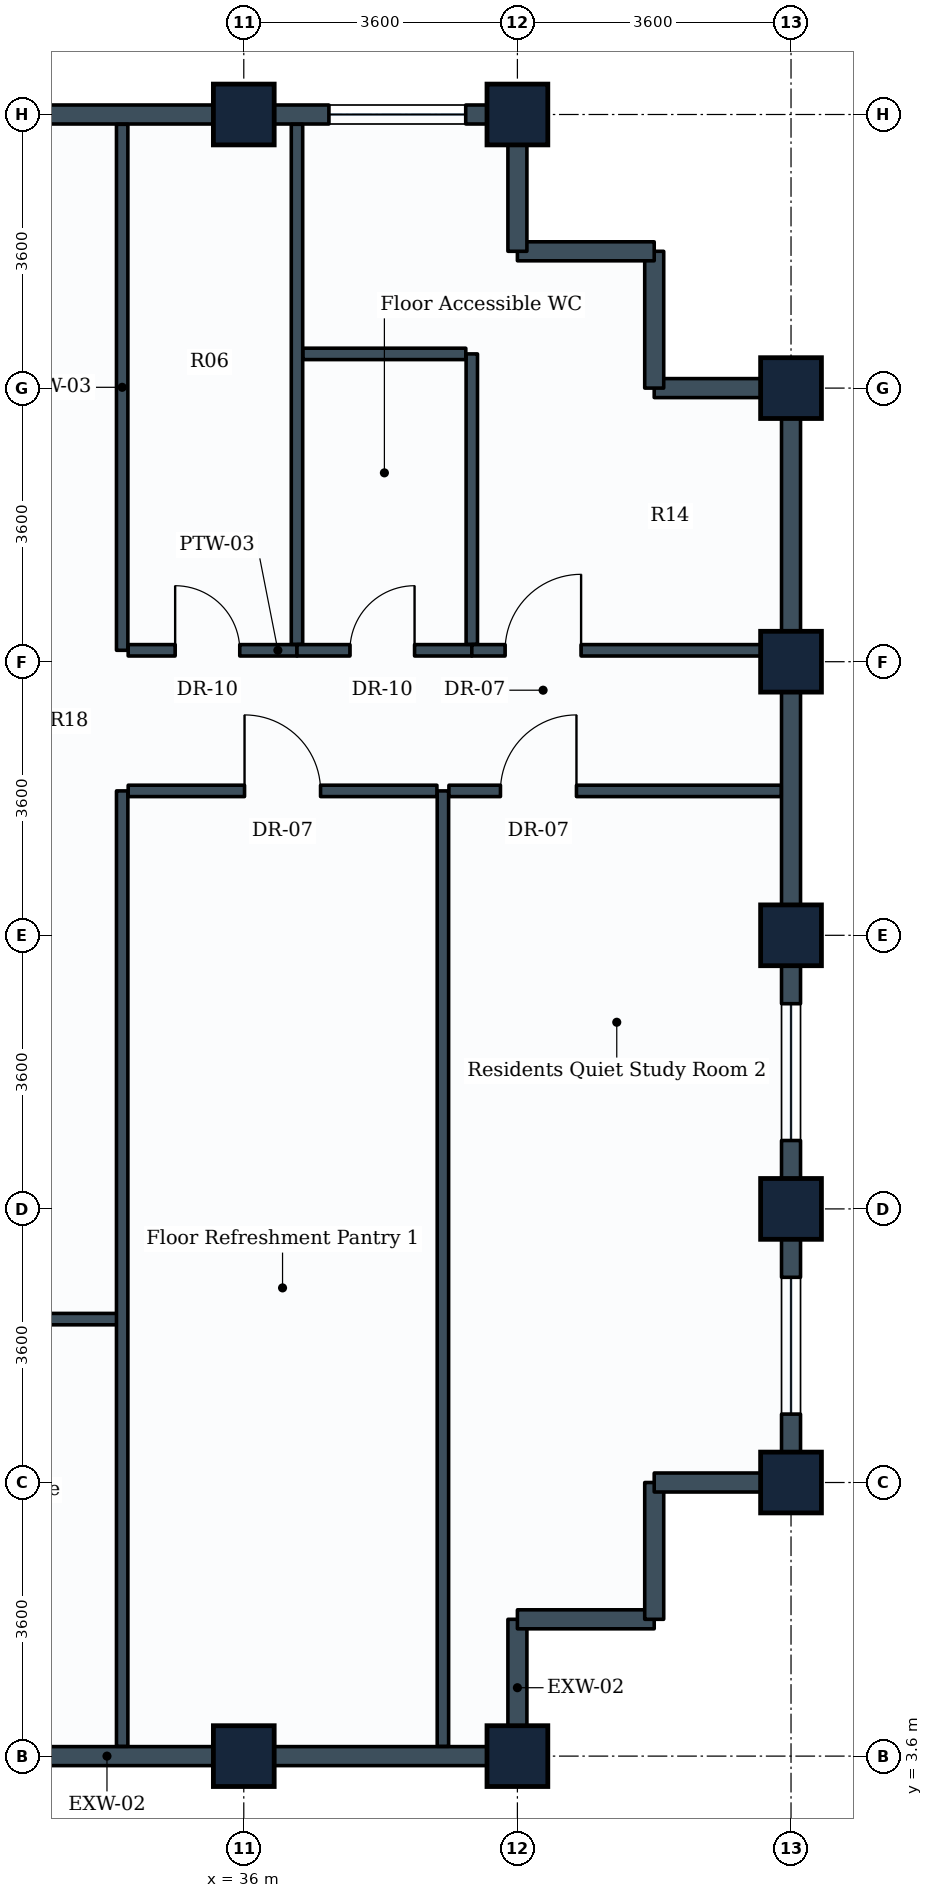
"""IFC4 building model, lengths in metres.
Left out: names, types, materials, properties, quantities, classifications, styles, units other than length and angle.
Written with IfcOpenShell. Run it as: python <this file> out.ifc"""

import sys

from ifc_helpers import new_model, si_unit, direction, frame, frame_2d, origin, origin_2d, place, context, subcontext, project, spatial, rectangle, extrude, element, fill, save


model = new_model("IFC4")
c1 = context("Model", 3, precision=1e-05, world=origin(), true_north=direction((0.0, 1.0)))
c2 = subcontext(c1, "Body", "Model", "MODEL_VIEW")
j1 = project(units=[si_unit("LENGTHUNIT", "METRE"), si_unit("PLANEANGLEUNIT", "RADIAN")], contexts=[c1])
p1 = place(None, origin())
s1 = spatial("IfcSite", under=j1, at=p1, CompositionType="ELEMENT")
p2 = place(p1, origin())
s2 = spatial("IfcBuilding", under=s1, at=p2, CompositionType="ELEMENT")
p3 = place(p2, frame((0.0, 0.0, 259.4)))
s3 = spatial("IfcBuildingStorey", under=s2, at=p3, CompositionType="ELEMENT", Elevation=259.4)
for number, where, z_axis, x_axis in (
    (1, (36.0, 3.6, 0.0), (0.0, 0.0, 1.0), (1.0, 0.0, 0.0)),
    (2, (36.0, 25.2, 0.0), (0.0, 0.0, 1.0), (1.0, 0.0, 0.0)),
    (3, (39.6, 3.6, 0.0), (0.0, 0.0, 1.0), (1.0, 0.0, 0.0)),
    (4, (39.6, 25.2, 0.0), (0.0, 0.0, 1.0), (1.0, 0.0, 0.0)),
    (5, (43.2, 7.2, 0.0), (0.0, 0.0, 1.0), (1.0, 0.0, 0.0)),
    (6, (43.2, 10.8, 0.0), (0.0, 0.0, 1.0), (0.0, 1.0, 0.0)),
    (7, (43.2, 14.4, 0.0), (0.0, 0.0, 1.0), (0.0, 1.0, 0.0)),
    (8, (43.2, 18.0, 0.0), (0.0, 0.0, 1.0), (0.0, 1.0, 0.0)),
    (9, (43.2, 21.6, 0.0), (0.0, 0.0, 1.0), (0.0, 1.0, 0.0)),
):
    element("IfcColumn", number, at=place(p3, frame(where, z_axis=z_axis, x_axis=x_axis)), inside=s3, PredefinedType="COLUMN", context=c2, shape_type="SweptSolid", body=[
        extrude(rectangle(XDim=0.8, YDim=0.8, at=origin_2d()), origin(), (0.0, 0.0, 1.0), 3.6),
    ])
for number, where, z_axis, x_axis in (
    (10, (36.0, 3.6, 0.0), (0.0, 0.0, 1.0), (-1.0, 0.0, 0.0)),
    (11, (39.6, 3.6, 0.0), (0.0, 0.0, 1.0), (-1.0, 0.0, 0.0)),
):
    element("IfcWall", number, at=place(p3, frame(where, z_axis=z_axis, x_axis=x_axis)), inside=s3, PredefinedType="STANDARD", context=c2, shape_type="SweptSolid", body=[
        extrude(rectangle(XDim=3.6, YDim=0.25, at=frame_2d((1.8, 0.0))), origin(), (0.0, 0.0, 1.0), 2.83),
    ])
p4 = place(p3, frame((39.6, 5.4, 0.0), z_axis=(0.0, 0.0, 1.0), x_axis=(0.0, -1.0, 0.0)))
e12 = element("IfcWall", 12, at=p4, inside=s3, PredefinedType="STANDARD", context=c2, shape_type="SweptSolid", body=[
    extrude(rectangle(XDim=1.8, YDim=0.25, at=frame_2d((0.9, 0.0))), origin(), (0.0, 0.0, 1.0), 2.83),
])
p5 = place(p3, frame((41.4, 5.4, 0.0), z_axis=(0.0, 0.0, 1.0), x_axis=(-1.0, 0.0, 0.0)))
e13 = element("IfcWall", 13, at=p5, inside=s3, PredefinedType="STANDARD", context=c2, shape_type="SweptSolid", body=[
    extrude(rectangle(XDim=1.8, YDim=0.25, at=frame_2d((0.9, 0.0))), origin(), (0.0, 0.0, 1.0), 3.335),
])
p6 = place(p3, frame((41.4, 7.2, 0.0), z_axis=(0.0, 0.0, 1.0), x_axis=(0.0, -1.0, 0.0)))
e14 = element("IfcWall", 14, at=p6, inside=s3, PredefinedType="STANDARD", context=c2, shape_type="SweptSolid", body=[
    extrude(rectangle(XDim=1.8, YDim=0.25, at=frame_2d((0.9, 0.0))), origin(), (0.0, 0.0, 1.0), 3.335),
])
p7 = place(p3, frame((43.2, 7.2, 0.0), z_axis=(0.0, 0.0, 1.0), x_axis=(-1.0, 0.0, 0.0)))
e15 = element("IfcWall", 15, at=p7, inside=s3, PredefinedType="STANDARD", context=c2, shape_type="SweptSolid", body=[
    extrude(rectangle(XDim=1.8, YDim=0.25, at=frame_2d((0.9, 0.0))), origin(), (0.0, 0.0, 1.0), 2.83),
])
p8 = place(p3, frame((43.2, 10.8, 0.0), z_axis=(0.0, 0.0, 1.0), x_axis=(0.0, -1.0, 0.0)))
e16 = element("IfcWall", 16, at=p8, inside=s3, PredefinedType="STANDARD", context=c2, shape_type="SweptSolid", body=[
    extrude(rectangle(XDim=3.6, YDim=0.25, at=frame_2d((1.8, 0.0))), origin(), (0.0, 0.0, 1.0), 2.83),
])
p9 = place(p8, frame((0.9, 0.0, 0.85)))
e17 = element("IfcOpeningElement", 17, at=p9, cuts=e16, PredefinedType="OPENING", context=c2, shape_type="SweptSolid", body=[
    extrude(rectangle(XDim=1.8, YDim=1.35, at=frame_2d((0.9, 0.675))), frame((0.0, 0.135, 0.0), z_axis=(0.0, -1.0, 0.0), x_axis=(1.0, 0.0, 0.0)), (0.0, 0.0, 1.0), 0.27),
])
p10 = place(p3, frame((43.2, 14.4, 0.0), z_axis=(0.0, 0.0, 1.0), x_axis=(0.0, -1.0, 0.0)))
e18 = element("IfcWall", 18, at=p10, inside=s3, PredefinedType="STANDARD", context=c2, shape_type="SweptSolid", body=[
    extrude(rectangle(XDim=3.6, YDim=0.25, at=frame_2d((1.8, 0.0))), origin(), (0.0, 0.0, 1.0), 2.83),
])
p11 = place(p10, frame((0.9, 0.0, 0.85)))
e19 = element("IfcOpeningElement", 19, at=p11, cuts=e18, PredefinedType="OPENING", context=c2, shape_type="SweptSolid", body=[
    extrude(rectangle(XDim=1.8, YDim=1.35, at=frame_2d((0.9, 0.675))), frame((0.0, 0.135, 0.0), z_axis=(0.0, -1.0, 0.0), x_axis=(1.0, 0.0, 0.0)), (0.0, 0.0, 1.0), 0.27),
])
for number, where, z_axis, x_axis in (
    (20, (43.2, 18.0, 0.0), (0.0, 0.0, 1.0), (0.0, -1.0, 0.0)),
    (21, (43.2, 21.6, 0.0), (0.0, 0.0, 1.0), (0.0, -1.0, 0.0)),
):
    element("IfcWall", number, at=place(p3, frame(where, z_axis=z_axis, x_axis=x_axis)), inside=s3, PredefinedType="STANDARD", context=c2, shape_type="SweptSolid", body=[
        extrude(rectangle(XDim=3.6, YDim=0.25, at=frame_2d((1.8, 0.0))), origin(), (0.0, 0.0, 1.0), 2.83),
    ])
p12 = place(p3, frame((41.4, 21.6, 0.0), z_axis=(0.0, 0.0, 1.0), x_axis=(1.0, 0.0, 0.0)))
e22 = element("IfcWall", 22, at=p12, inside=s3, PredefinedType="STANDARD", context=c2, shape_type="SweptSolid", body=[
    extrude(rectangle(XDim=1.8, YDim=0.25, at=frame_2d((0.9, 0.0))), origin(), (0.0, 0.0, 1.0), 2.83),
])
for number, where, z_axis, x_axis in (
    (23, (41.4, 23.4, 0.0), (0.0, 0.0, 1.0), (0.0, -1.0, 0.0)),
    (24, (39.6, 23.4, 0.0), (0.0, 0.0, 1.0), (1.0, 0.0, 0.0)),
):
    element("IfcWall", number, at=place(p3, frame(where, z_axis=z_axis, x_axis=x_axis)), inside=s3, PredefinedType="STANDARD", context=c2, shape_type="SweptSolid", body=[
        extrude(rectangle(XDim=1.8, YDim=0.25, at=frame_2d((0.9, 0.0))), origin(), (0.0, 0.0, 1.0), 3.335),
    ])
p13 = place(p3, frame((39.6, 25.2, 0.0), z_axis=(0.0, 0.0, 1.0), x_axis=(0.0, -1.0, 0.0)))
e25 = element("IfcWall", 25, at=p13, inside=s3, PredefinedType="STANDARD", context=c2, shape_type="SweptSolid", body=[
    extrude(rectangle(XDim=1.8, YDim=0.25, at=frame_2d((0.9, 0.0))), origin(), (0.0, 0.0, 1.0), 2.83),
])
p14 = place(p3, frame((36.0, 25.2, 0.0), z_axis=(0.0, 0.0, 1.0), x_axis=(1.0, 0.0, 0.0)))
e26 = element("IfcWall", 26, at=p14, inside=s3, PredefinedType="STANDARD", context=c2, shape_type="SweptSolid", body=[
    extrude(rectangle(XDim=3.6, YDim=0.25, at=frame_2d((1.8, 0.0))), origin(), (0.0, 0.0, 1.0), 2.83),
])
p15 = place(p14, frame((1.12, 0.0, 0.85)))
e27 = element("IfcOpeningElement", 27, at=p15, cuts=e26, PredefinedType="OPENING", context=c2, shape_type="SweptSolid", body=[
    extrude(rectangle(XDim=1.8, YDim=1.35, at=frame_2d((0.9, 0.675))), frame((0.0, 0.135, 0.0), z_axis=(0.0, -1.0, 0.0), x_axis=(1.0, 0.0, 0.0)), (0.0, 0.0, 1.0), 0.27),
])
p16 = place(p3, frame((32.4, 25.2, 0.0), z_axis=(0.0, 0.0, 1.0), x_axis=(1.0, 0.0, 0.0)))
e28 = element("IfcWall", 28, at=p16, inside=s3, PredefinedType="STANDARD", context=c2, shape_type="SweptSolid", body=[
    extrude(rectangle(XDim=3.6, YDim=0.25, at=frame_2d((1.8, 0.0))), origin(), (0.0, 0.0, 1.0), 2.83),
])
p17 = place(p3, frame((34.4, 18.15, 0.0), z_axis=(0.0, 0.0, 1.0), x_axis=(0.0, 1.0, 0.0)))
e29 = element("IfcWall", 29, at=p17, inside=s3, PredefinedType="PARTITIONING", context=c2, shape_type="SweptSolid", body=[
    extrude(rectangle(XDim=6.921, YDim=0.15, at=frame_2d((3.46, 0.0))), origin(), (0.0, 0.0, 1.0), 2.83),
])
p18 = place(p3, frame((34.479, 18.15, 0.0), z_axis=(0.0, 0.0, 1.0), x_axis=(1.0, 0.0, 0.0)))
e30 = element("IfcWall", 30, at=p18, inside=s3, PredefinedType="PARTITIONING", context=c2, shape_type="SweptSolid", body=[
    extrude(rectangle(XDim=2.221, YDim=0.15, at=frame_2d((1.11, 0.0))), origin(), (0.0, 0.0, 1.0), 3.02),
])
p19 = place(p18, frame((0.618, 0.0, 0.0)))
e31 = element("IfcOpeningElement", 31, at=p19, cuts=e30, PredefinedType="OPENING", context=c2, shape_type="SweptSolid", body=[
    extrude(rectangle(XDim=0.85, YDim=2.1, at=frame_2d((0.425, 1.05))), frame((0.0, 0.085, 0.0), z_axis=(0.0, -1.0, 0.0), x_axis=(1.0, 0.0, 0.0)), (0.0, 0.0, 1.0), 0.17),
])
p20 = place(p3, frame((36.7, 18.229, 0.0), z_axis=(0.0, 0.0, 1.0), x_axis=(0.0, 1.0, 0.0)))
e32 = element("IfcWall", 32, at=p20, inside=s3, PredefinedType="PARTITIONING", context=c2, shape_type="SweptSolid", body=[
    extrude(rectangle(XDim=6.842, YDim=0.15, at=frame_2d((3.421, 0.0))), origin(), (0.0, 0.0, 1.0), 2.83),
])
p21 = place(p3, frame((36.7, 18.15, 0.0), z_axis=(0.0, 0.0, 1.0), x_axis=(1.0, 0.0, 0.0)))
e33 = element("IfcWall", 33, at=p21, inside=s3, PredefinedType="PARTITIONING", context=c2, shape_type="SweptSolid", body=[
    extrude(rectangle(XDim=2.3, YDim=0.15, at=frame_2d((1.15, 0.0))), origin(), (0.0, 0.0, 1.0), 3.335),
])
p22 = place(p21, frame((0.697, 0.0, 0.0)))
e34 = element("IfcOpeningElement", 34, at=p22, cuts=e33, PredefinedType="OPENING", context=c2, shape_type="SweptSolid", body=[
    extrude(rectangle(XDim=0.85, YDim=2.1, at=frame_2d((0.425, 1.05))), frame((0.0, 0.085, 0.0), z_axis=(0.0, -1.0, 0.0), x_axis=(1.0, 0.0, 0.0)), (0.0, 0.0, 1.0), 0.17),
])
p23 = place(p3, frame((39.0, 18.229, 0.0), z_axis=(0.0, 0.0, 1.0), x_axis=(0.0, 1.0, 0.0)))
e35 = element("IfcWall", 35, at=p23, inside=s3, PredefinedType="PARTITIONING", context=c2, shape_type="SweptSolid", body=[
    extrude(rectangle(XDim=3.821, YDim=0.15, at=frame_2d((1.911, 0.0))), origin(), (0.0, 0.0, 1.0), 3.335),
])
p24 = place(p3, frame((36.779, 22.05, 0.0), z_axis=(0.0, 0.0, 1.0), x_axis=(1.0, 0.0, 0.0)))
e36 = element("IfcWall", 36, at=p24, inside=s3, PredefinedType="PARTITIONING", context=c2, shape_type="SweptSolid", body=[
    extrude(rectangle(XDim=2.142, YDim=0.15, at=frame_2d((1.071, 0.0))), origin(), (0.0, 0.0, 1.0), 3.335),
])
p25 = place(p3, frame((28.879, 9.35, 0.0), z_axis=(0.0, 0.0, 1.0), x_axis=(1.0, 0.0, 0.0)))
e37 = element("IfcWall", 37, at=p25, inside=s3, PredefinedType="PARTITIONING", context=c2, shape_type="SweptSolid", body=[
    extrude(rectangle(XDim=5.521, YDim=0.15, at=frame_2d((2.76, 0.0))), origin(), (0.0, 0.0, 1.0), 3.335),
])
p26 = place(p25, frame((0.36, 0.0, 0.0)))
e38 = element("IfcOpeningElement", 38, at=p26, cuts=e37, PredefinedType="OPENING", context=c2, shape_type="SweptSolid", body=[
    extrude(rectangle(XDim=1.0, YDim=2.1, at=frame_2d((0.5, 1.05))), frame((0.0, 0.085, 0.0), z_axis=(0.0, -1.0, 0.0), x_axis=(1.0, 0.0, 0.0)), (0.0, 0.0, 1.0), 0.17),
])
for number, where, z_axis, x_axis in (
    (39, (34.4, 3.729, 0.0), (0.0, 0.0, 1.0), (0.0, 1.0, 0.0)),
    (40, (38.62, 3.729, 0.0), (0.0, 0.0, 1.0), (0.0, 1.0, 0.0)),
):
    element("IfcWall", number, at=place(p3, frame(where, z_axis=z_axis, x_axis=x_axis)), inside=s3, PredefinedType="PARTITIONING", context=c2, shape_type="SweptSolid", body=[
        extrude(rectangle(XDim=12.571, YDim=0.15, at=frame_2d((6.286, 0.0))), origin(), (0.0, 0.0, 1.0), 2.83),
    ])
p27 = place(p3, frame((34.479, 16.3, 0.0), z_axis=(0.0, 0.0, 1.0), x_axis=(1.0, 0.0, 0.0)))
e41 = element("IfcWall", 41, at=p27, inside=s3, PredefinedType="PARTITIONING", context=c2, shape_type="SweptSolid", body=[
    extrude(rectangle(XDim=4.062, YDim=0.15, at=frame_2d((2.031, 0.0))), origin(), (0.0, 0.0, 1.0), 3.02),
])
p28 = place(p27, frame((1.531, 0.0, 0.0)))
e42 = element("IfcOpeningElement", 42, at=p28, cuts=e41, PredefinedType="OPENING", context=c2, shape_type="SweptSolid", body=[
    extrude(rectangle(XDim=1.0, YDim=2.1, at=frame_2d((0.5, 1.05))), frame((0.0, 0.085, 0.0), z_axis=(0.0, -1.0, 0.0), x_axis=(1.0, 0.0, 0.0)), (0.0, 0.0, 1.0), 0.17),
])
p29 = place(p3, frame((38.699, 16.3, 0.0), z_axis=(0.0, 0.0, 1.0), x_axis=(1.0, 0.0, 0.0)))
e43 = element("IfcWall", 43, at=p29, inside=s3, PredefinedType="PARTITIONING", context=c2, shape_type="SweptSolid", body=[
    extrude(rectangle(XDim=4.372, YDim=0.15, at=frame_2d((2.186, 0.0))), origin(), (0.0, 0.0, 1.0), 2.83),
])
p30 = place(p29, frame((0.678, 0.0, 0.0)))
e44 = element("IfcOpeningElement", 44, at=p30, cuts=e43, PredefinedType="OPENING", context=c2, shape_type="SweptSolid", body=[
    extrude(rectangle(XDim=1.0, YDim=2.1, at=frame_2d((0.5, 1.05))), frame((0.0, 0.085, 0.0), z_axis=(0.0, -1.0, 0.0), x_axis=(1.0, 0.0, 0.0)), (0.0, 0.0, 1.0), 0.17),
])
p31 = place(p3, frame((39.0, 18.15, 0.0), z_axis=(0.0, 0.0, 1.0), x_axis=(1.0, 0.0, 0.0)))
e45 = element("IfcWall", 45, at=p31, inside=s3, PredefinedType="PARTITIONING", context=c2, shape_type="SweptSolid", body=[
    extrude(rectangle(XDim=4.071, YDim=0.15, at=frame_2d((2.036, 0.0))), origin(), (0.0, 0.0, 1.0), 2.83),
])
p32 = place(p31, frame((0.438, 0.0, 0.0)))
e46 = element("IfcOpeningElement", 46, at=p32, cuts=e45, PredefinedType="OPENING", context=c2, shape_type="SweptSolid", body=[
    extrude(rectangle(XDim=1.0, YDim=2.1, at=frame_2d((0.5, 1.05))), frame((0.0, 0.085, 0.0), z_axis=(0.0, -1.0, 0.0), x_axis=(1.0, 0.0, 0.0)), (0.0, 0.0, 1.0), 0.17),
])
p33 = place(p9, origin())
e47 = element("IfcWindow", 47, at=p33, inside=s3, PartitioningType="SINGLE_PANEL", PredefinedType="WINDOW", context=c2, shape_type="SweptSolid", body=[
    extrude(rectangle(XDim=1.8, YDim=1.35, at=frame_2d((0.9, 0.675))), frame((0.0, 0.03, 0.0), z_axis=(0.0, -1.0, 0.0), x_axis=(1.0, 0.0, 0.0)), (0.0, 0.0, 1.0), 0.06),
])
fill(e17, e47)
p34 = place(p11, origin())
e48 = element("IfcWindow", 48, at=p34, inside=s3, PartitioningType="SINGLE_PANEL", PredefinedType="WINDOW", context=c2, shape_type="SweptSolid", body=[
    extrude(rectangle(XDim=1.8, YDim=1.35, at=frame_2d((0.9, 0.675))), frame((0.0, 0.03, 0.0), z_axis=(0.0, -1.0, 0.0), x_axis=(1.0, 0.0, 0.0)), (0.0, 0.0, 1.0), 0.06),
])
fill(e19, e48)
p35 = place(p15, origin())
e49 = element("IfcWindow", 49, at=p35, inside=s3, PartitioningType="SINGLE_PANEL", PredefinedType="WINDOW", context=c2, shape_type="SweptSolid", body=[
    extrude(rectangle(XDim=1.8, YDim=1.35, at=frame_2d((0.9, 0.675))), frame((0.0, 0.03, 0.0), z_axis=(0.0, -1.0, 0.0), x_axis=(1.0, 0.0, 0.0)), (0.0, 0.0, 1.0), 0.06),
])
fill(e27, e49)
p36 = place(p19, origin())
e50 = element("IfcDoor", 50, at=p36, inside=s3, OperationType="SINGLE_SWING_LEFT", PredefinedType="DOOR", context=c2, shape_type="SweptSolid", body=[
    extrude(rectangle(XDim=0.85, YDim=2.1, at=frame_2d((0.425, 1.05))), frame((0.0, 0.025, 0.0), z_axis=(0.0, -1.0, 0.0), x_axis=(1.0, 0.0, 0.0)), (0.0, 0.0, 1.0), 0.05),
])
fill(e31, e50)
p37 = place(p22, origin())
e51 = element("IfcDoor", 51, at=p37, inside=s3, OperationType="SINGLE_SWING_RIGHT", PredefinedType="DOOR", context=c2, shape_type="SweptSolid", body=[
    extrude(rectangle(XDim=0.85, YDim=2.1, at=frame_2d((0.425, 1.05))), frame((0.0, 0.025, 0.0), z_axis=(0.0, -1.0, 0.0), x_axis=(1.0, 0.0, 0.0)), (0.0, 0.0, 1.0), 0.05),
])
fill(e34, e51)
p38 = place(p28, origin())
e52 = element("IfcDoor", 52, at=p38, inside=s3, OperationType="SINGLE_SWING_LEFT", PredefinedType="DOOR", context=c2, shape_type="SweptSolid", body=[
    extrude(rectangle(XDim=1.0, YDim=2.1, at=frame_2d((0.5, 1.05))), frame((0.0, 0.025, 0.0), z_axis=(0.0, -1.0, 0.0), x_axis=(1.0, 0.0, 0.0)), (0.0, 0.0, 1.0), 0.05),
])
fill(e42, e52)
p39 = place(p30, origin())
e53 = element("IfcDoor", 53, at=p39, inside=s3, OperationType="SINGLE_SWING_RIGHT", PredefinedType="DOOR", context=c2, shape_type="SweptSolid", body=[
    extrude(rectangle(XDim=1.0, YDim=2.1, at=frame_2d((0.5, 1.05))), frame((0.0, 0.025, 0.0), z_axis=(0.0, -1.0, 0.0), x_axis=(1.0, 0.0, 0.0)), (0.0, 0.0, 1.0), 0.05),
])
fill(e44, e53)
p40 = place(p32, origin())
e54 = element("IfcDoor", 54, at=p40, inside=s3, OperationType="SINGLE_SWING_RIGHT", PredefinedType="DOOR", context=c2, shape_type="SweptSolid", body=[
    extrude(rectangle(XDim=1.0, YDim=2.1, at=frame_2d((0.5, 1.05))), frame((0.0, 0.025, 0.0), z_axis=(0.0, -1.0, 0.0), x_axis=(1.0, 0.0, 0.0)), (0.0, 0.0, 1.0), 0.05),
])
fill(e46, e54)
save(model, sys.argv[1])
